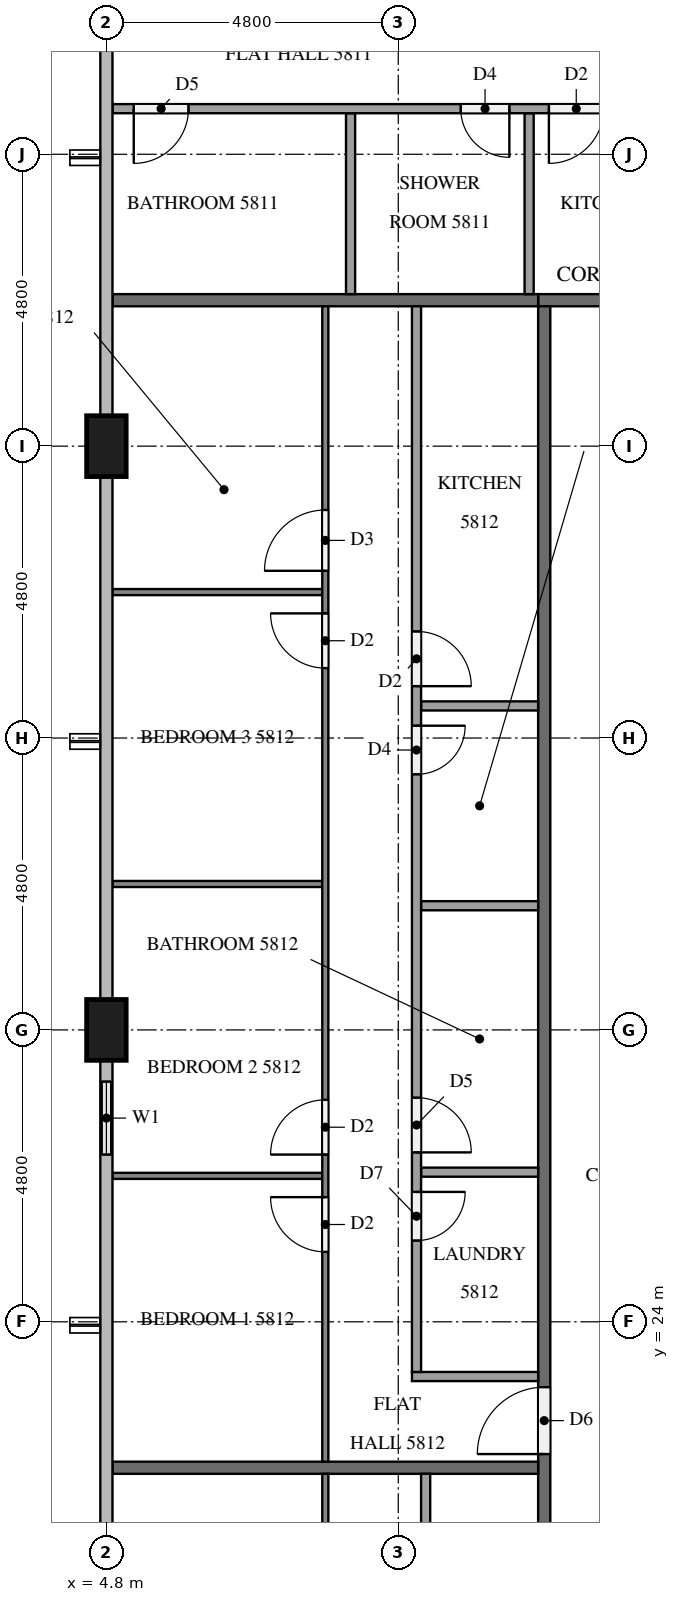
"""IFC4 building model, lengths in metres.
Left out: names, types, materials, properties, quantities, classifications, styles, units other than length and angle.
Written with IfcOpenShell. Run it as: python <this file> out.ifc"""

import sys

from ifc_helpers import new_model, si_unit, direction, frame, frame_2d, origin, origin_2d, place, context, subcontext, project, spatial, rectangle, extrude, element, fill, save


model = new_model("IFC4")
c1 = context("Model", 3, precision=1e-05, world=origin(), true_north=direction((0.0, 1.0)))
c2 = subcontext(c1, "Body", "Model", "MODEL_VIEW")
j1 = project(units=[si_unit("LENGTHUNIT", "METRE"), si_unit("PLANEANGLEUNIT", "RADIAN")], contexts=[c1])
p1 = place(None, origin())
s1 = spatial("IfcSite", under=j1, at=p1, CompositionType="ELEMENT")
p2 = place(p1, origin())
s2 = spatial("IfcBuilding", under=s1, at=p2, CompositionType="ELEMENT")
p3 = place(p2, frame((0.0, 0.0, 222.8)))
s3 = spatial("IfcBuildingStorey", under=s2, at=p3, CompositionType="ELEMENT", Elevation=222.8)
for number, where, z_axis, x_axis in (
    (1, (4.8, 38.4, 0.0), (0.0, 0.0, 1.0), (0.0, 1.0, 0.0)),
    (2, (4.8, 28.8, 0.0), (0.0, 0.0, 1.0), (0.0, 1.0, 0.0)),
):
    element("IfcColumn", number, at=place(p3, frame(where, z_axis=z_axis, x_axis=x_axis)), inside=s3, PredefinedType="COLUMN", context=c2, shape_type="SweptSolid", body=[
        extrude(rectangle(XDim=1.0, YDim=0.65, at=origin_2d()), origin(), (0.0, 0.0, 1.0), 3.2),
    ])
p4 = place(p3, frame((4.8, 28.3, 0.0), z_axis=(0.0, 0.0, 1.0), x_axis=(0.0, -1.0, 0.0)))
e3 = element("IfcWall", 3, at=p4, inside=s3, PredefinedType="SOLIDWALL", context=c2, shape_type="SweptSolid", body=[
    extrude(rectangle(XDim=1.9, YDim=0.15, at=frame_2d((0.95, 0.0))), origin(), (0.0, 0.0, 1.0), 3.2),
])
p5 = place(p4, frame((0.35, 0.0, 0.9)))
e4 = element("IfcOpeningElement", 4, at=p5, cuts=e3, PredefinedType="OPENING", context=c2, shape_type="SweptSolid", body=[
    extrude(rectangle(XDim=1.2, YDim=1.4, at=frame_2d((0.6, 0.7))), frame((0.0, 0.085, 0.0), z_axis=(0.0, -1.0, 0.0), x_axis=(1.0, 0.0, 0.0)), (0.0, 0.0, 1.0), 0.17),
])
p6 = place(p3, frame((11.9, 40.8, 0.0), z_axis=(0.0, 0.0, 1.0), x_axis=(1.0, 0.0, 0.0)))
e5 = element("IfcWall", 5, at=p6, inside=s3, PredefinedType="PARTITIONING", context=c2, shape_type="SweptSolid", body=[
    extrude(rectangle(XDim=38.6, YDim=0.2, at=frame_2d((19.3, 0.0))), origin(), (0.0, 0.0, 1.0), 3.2),
])
p7 = place(p6, frame((33.975, 0.0, 0.0)))
e6 = element("IfcOpeningElement", 6, at=p7, cuts=e5, PredefinedType="OPENING", context=c2, shape_type="SweptSolid", body=[
    extrude(rectangle(XDim=1.0, YDim=2.1, at=frame_2d((0.5, 1.05))), frame((0.0, 0.11, 0.0), z_axis=(0.0, -1.0, 0.0), x_axis=(1.0, 0.0, 0.0)), (0.0, 0.0, 1.0), 0.22),
])
p8 = place(p6, frame((14.725, 0.0, 0.0)))
e7 = element("IfcOpeningElement", 7, at=p8, cuts=e5, PredefinedType="OPENING", context=c2, shape_type="SweptSolid", body=[
    extrude(rectangle(XDim=1.1, YDim=2.1, at=frame_2d((0.55, 1.05))), frame((0.0, 0.11, 0.0), z_axis=(0.0, -1.0, 0.0), x_axis=(1.0, 0.0, 0.0)), (0.0, 0.0, 1.0), 0.22),
])
p9 = place(p6, frame((7.575, 0.0, 0.0)))
e8 = element("IfcOpeningElement", 8, at=p9, cuts=e5, PredefinedType="OPENING", context=c2, shape_type="SweptSolid", body=[
    extrude(rectangle(XDim=1.0, YDim=2.1, at=frame_2d((0.5, 1.05))), frame((0.0, 0.11, 0.0), z_axis=(0.0, -1.0, 0.0), x_axis=(1.0, 0.0, 0.0)), (0.0, 0.0, 1.0), 0.22),
])
p10 = place(p6, frame((6.025, 0.0, 0.0)))
e9 = element("IfcOpeningElement", 9, at=p10, cuts=e5, PredefinedType="OPENING", context=c2, shape_type="SweptSolid", body=[
    extrude(rectangle(XDim=1.0, YDim=2.1, at=frame_2d((0.5, 1.05))), frame((0.0, 0.11, 0.0), z_axis=(0.0, -1.0, 0.0), x_axis=(1.0, 0.0, 0.0)), (0.0, 0.0, 1.0), 0.22),
])
p11 = place(p3, frame((12.0, 12.1, 0.0), z_axis=(0.0, 0.0, 1.0), x_axis=(0.0, 1.0, 0.0)))
e10 = element("IfcWall", 10, at=p11, inside=s3, PredefinedType="PARTITIONING", context=c2, shape_type="SweptSolid", body=[
    extrude(rectangle(XDim=28.6, YDim=0.2, at=frame_2d((14.3, 0.0))), origin(), (0.0, 0.0, 1.0), 3.2),
])
p12 = place(p11, frame((9.725, 0.0, 0.0)))
e11 = element("IfcOpeningElement", 11, at=p12, cuts=e10, PredefinedType="OPENING", context=c2, shape_type="SweptSolid", body=[
    extrude(rectangle(XDim=1.1, YDim=2.1, at=frame_2d((0.55, 1.05))), frame((0.0, 0.11, 0.0), z_axis=(0.0, -1.0, 0.0), x_axis=(1.0, 0.0, 0.0)), (0.0, 0.0, 1.0), 0.22),
])
p13 = place(p11, frame((0.175, 0.0, 0.0)))
e12 = element("IfcOpeningElement", 12, at=p13, cuts=e10, PredefinedType="OPENING", context=c2, shape_type="SweptSolid", body=[
    extrude(rectangle(XDim=1.0, YDim=2.1, at=frame_2d((0.5, 1.05))), frame((0.0, 0.11, 0.0), z_axis=(0.0, -1.0, 0.0), x_axis=(1.0, 0.0, 0.0)), (0.0, 0.0, 1.0), 0.22),
])
for number, where, z_axis, x_axis in (
    (13, (4.9, 40.8, 0.0), (0.0, 0.0, 1.0), (1.0, 0.0, 0.0)),
    (14, (4.9, 21.6, 0.0), (0.0, 0.0, 1.0), (1.0, 0.0, 0.0)),
):
    element("IfcWall", number, at=place(p3, frame(where, z_axis=z_axis, x_axis=x_axis)), inside=s3, PredefinedType="PARTITIONING", context=c2, shape_type="SweptSolid", body=[
        extrude(rectangle(XDim=7.0, YDim=0.2, at=frame_2d((3.5, 0.0))), origin(), (0.0, 0.0, 1.0), 3.2),
    ])
for number, where, z_axis, x_axis in (
    (15, (11.752, 40.9, 0.0), (0.0, 0.0, 1.0), (0.0, 1.0, 0.0)),
    (16, (8.815, 40.9, 0.0), (0.0, 0.0, 1.0), (0.0, 1.0, 0.0)),
):
    element("IfcWall", number, at=place(p3, frame(where, z_axis=z_axis, x_axis=x_axis)), inside=s3, PredefinedType="PARTITIONING", context=c2, shape_type="SweptSolid", body=[
        extrude(rectangle(XDim=2.975, YDim=0.15, at=frame_2d((1.488, 0.0))), origin(), (0.0, 0.0, 1.0), 3.2),
    ])
p14 = place(p3, frame((17.625, 43.95, 0.0), z_axis=(0.0, 0.0, 1.0), x_axis=(-1.0, 0.0, 0.0)))
e17 = element("IfcWall", 17, at=p14, inside=s3, PredefinedType="PARTITIONING", context=c2, shape_type="SweptSolid", body=[
    extrude(rectangle(XDim=12.725, YDim=0.15, at=frame_2d((6.363, 0.0))), origin(), (0.0, 0.0, 1.0), 3.2),
])
p15 = place(p14, frame((4.648, 0.0, 0.0)))
e18 = element("IfcOpeningElement", 18, at=p15, cuts=e17, PredefinedType="OPENING", context=c2, shape_type="SweptSolid", body=[
    extrude(rectangle(XDim=0.9, YDim=2.1, at=frame_2d((0.45, 1.05))), frame((0.0, 0.085, 0.0), z_axis=(0.0, -1.0, 0.0), x_axis=(1.0, 0.0, 0.0)), (0.0, 0.0, 1.0), 0.17),
])
p16 = place(p14, frame((6.198, 0.0, 0.0)))
e19 = element("IfcOpeningElement", 19, at=p16, cuts=e17, PredefinedType="OPENING", context=c2, shape_type="SweptSolid", body=[
    extrude(rectangle(XDim=0.8, YDim=2.1, at=frame_2d((0.4, 1.05))), frame((0.0, 0.085, 0.0), z_axis=(0.0, -1.0, 0.0), x_axis=(1.0, 0.0, 0.0)), (0.0, 0.0, 1.0), 0.17),
])
p17 = place(p14, frame((11.475, 0.0, 0.0)))
e20 = element("IfcOpeningElement", 20, at=p17, cuts=e17, PredefinedType="OPENING", context=c2, shape_type="SweptSolid", body=[
    extrude(rectangle(XDim=0.9, YDim=2.1, at=frame_2d((0.45, 1.05))), frame((0.0, 0.085, 0.0), z_axis=(0.0, -1.0, 0.0), x_axis=(1.0, 0.0, 0.0)), (0.0, 0.0, 1.0), 0.17),
])
for number, where, z_axis, x_axis in (
    (21, (8.35, 26.4, 0.0), (0.0, 0.0, 1.0), (-1.0, 0.0, 0.0)),
    (22, (8.35, 31.2, 0.0), (0.0, 0.0, 1.0), (-1.0, 0.0, 0.0)),
    (23, (8.35, 36.0, 0.0), (0.0, 0.0, 1.0), (-1.0, 0.0, 0.0)),
):
    element("IfcWall", number, at=place(p3, frame(where, z_axis=z_axis, x_axis=x_axis)), inside=s3, PredefinedType="PARTITIONING", context=c2, shape_type="SweptSolid", body=[
        extrude(rectangle(XDim=3.45, YDim=0.1, at=frame_2d((1.725, 0.0))), origin(), (0.0, 0.0, 1.0), 3.2),
    ])
p18 = place(p3, frame((8.4, 21.7, 0.0), z_axis=(0.0, 0.0, 1.0), x_axis=(0.0, 1.0, 0.0)))
e24 = element("IfcWall", 24, at=p18, inside=s3, PredefinedType="PARTITIONING", context=c2, shape_type="SweptSolid", body=[
    extrude(rectangle(XDim=19.0, YDim=0.1, at=frame_2d((9.5, 0.0))), origin(), (0.0, 0.0, 1.0), 3.2),
])
p19 = place(p18, frame((3.45, 0.0, 0.0)))
e25 = element("IfcOpeningElement", 25, at=p19, cuts=e24, PredefinedType="OPENING", context=c2, shape_type="SweptSolid", body=[
    extrude(rectangle(XDim=0.9, YDim=2.1, at=frame_2d((0.45, 1.05))), frame((0.0, 0.06, 0.0), z_axis=(0.0, -1.0, 0.0), x_axis=(1.0, 0.0, 0.0)), (0.0, 0.0, 1.0), 0.12),
])
p20 = place(p18, frame((5.05, 0.0, 0.0)))
e26 = element("IfcOpeningElement", 26, at=p20, cuts=e24, PredefinedType="OPENING", context=c2, shape_type="SweptSolid", body=[
    extrude(rectangle(XDim=0.9, YDim=2.1, at=frame_2d((0.45, 1.05))), frame((0.0, 0.06, 0.0), z_axis=(0.0, -1.0, 0.0), x_axis=(1.0, 0.0, 0.0)), (0.0, 0.0, 1.0), 0.12),
])
p21 = place(p18, frame((13.05, 0.0, 0.0)))
e27 = element("IfcOpeningElement", 27, at=p21, cuts=e24, PredefinedType="OPENING", context=c2, shape_type="SweptSolid", body=[
    extrude(rectangle(XDim=0.9, YDim=2.1, at=frame_2d((0.45, 1.05))), frame((0.0, 0.06, 0.0), z_axis=(0.0, -1.0, 0.0), x_axis=(1.0, 0.0, 0.0)), (0.0, 0.0, 1.0), 0.12),
])
p22 = place(p18, frame((14.65, 0.0, 0.0)))
e28 = element("IfcOpeningElement", 28, at=p22, cuts=e24, PredefinedType="OPENING", context=c2, shape_type="SweptSolid", body=[
    extrude(rectangle(XDim=1.0, YDim=2.1, at=frame_2d((0.5, 1.05))), frame((0.0, 0.06, 0.0), z_axis=(0.0, -1.0, 0.0), x_axis=(1.0, 0.0, 0.0)), (0.0, 0.0, 1.0), 0.12),
])
for number, where, z_axis, x_axis in (
    (29, (11.9, 26.461, 0.0), (0.0, 0.0, 1.0), (-1.0, 0.0, 0.0)),
    (30, (11.9, 30.842, 0.0), (0.0, 0.0, 1.0), (-1.0, 0.0, 0.0)),
    (31, (11.9, 34.128, 0.0), (0.0, 0.0, 1.0), (-1.0, 0.0, 0.0)),
):
    element("IfcWall", number, at=place(p3, frame(where, z_axis=z_axis, x_axis=x_axis)), inside=s3, PredefinedType="PARTITIONING", context=c2, shape_type="SweptSolid", body=[
        extrude(rectangle(XDim=1.925, YDim=0.15, at=frame_2d((0.962, 0.0))), origin(), (0.0, 0.0, 1.0), 3.2),
    ])
p23 = place(p3, frame((11.9, 23.1, 0.0), z_axis=(0.0, 0.0, 1.0), x_axis=(-1.0, 0.0, 0.0)))
e32 = element("IfcWall", 32, at=p23, inside=s3, PredefinedType="PARTITIONING", context=c2, shape_type="SweptSolid", body=[
    extrude(rectangle(XDim=2.075, YDim=0.15, at=frame_2d((1.038, 0.0))), origin(), (0.0, 0.0, 1.0), 3.2),
])
p24 = place(p3, frame((9.9, 40.7, 0.0), z_axis=(0.0, 0.0, 1.0), x_axis=(0.0, -1.0, 0.0)))
e33 = element("IfcWall", 33, at=p24, inside=s3, PredefinedType="PARTITIONING", context=c2, shape_type="SweptSolid", body=[
    extrude(rectangle(XDim=17.525, YDim=0.15, at=frame_2d((8.762, 0.0))), origin(), (0.0, 0.0, 1.0), 3.2),
])
p25 = place(p24, frame((14.564, 0.0, 0.0)))
e34 = element("IfcOpeningElement", 34, at=p25, cuts=e33, PredefinedType="OPENING", context=c2, shape_type="SweptSolid", body=[
    extrude(rectangle(XDim=0.8, YDim=2.1, at=frame_2d((0.4, 1.05))), frame((0.0, 0.085, 0.0), z_axis=(0.0, -1.0, 0.0), x_axis=(1.0, 0.0, 0.0)), (0.0, 0.0, 1.0), 0.17),
])
p26 = place(p24, frame((13.014, 0.0, 0.0)))
e35 = element("IfcOpeningElement", 35, at=p26, cuts=e33, PredefinedType="OPENING", context=c2, shape_type="SweptSolid", body=[
    extrude(rectangle(XDim=0.9, YDim=2.1, at=frame_2d((0.45, 1.05))), frame((0.0, 0.085, 0.0), z_axis=(0.0, -1.0, 0.0), x_axis=(1.0, 0.0, 0.0)), (0.0, 0.0, 1.0), 0.17),
])
p27 = place(p24, frame((6.897, 0.0, 0.0)))
e36 = element("IfcOpeningElement", 36, at=p27, cuts=e33, PredefinedType="OPENING", context=c2, shape_type="SweptSolid", body=[
    extrude(rectangle(XDim=0.8, YDim=2.1, at=frame_2d((0.4, 1.05))), frame((0.0, 0.085, 0.0), z_axis=(0.0, -1.0, 0.0), x_axis=(1.0, 0.0, 0.0)), (0.0, 0.0, 1.0), 0.17),
])
p28 = place(p24, frame((5.347, 0.0, 0.0)))
e37 = element("IfcOpeningElement", 37, at=p28, cuts=e33, PredefinedType="OPENING", context=c2, shape_type="SweptSolid", body=[
    extrude(rectangle(XDim=0.9, YDim=2.1, at=frame_2d((0.45, 1.05))), frame((0.0, 0.085, 0.0), z_axis=(0.0, -1.0, 0.0), x_axis=(1.0, 0.0, 0.0)), (0.0, 0.0, 1.0), 0.17),
])
p29 = place(p3, frame((8.4, 12.1, 0.0), z_axis=(0.0, 0.0, 1.0), x_axis=(0.0, 1.0, 0.0)))
e38 = element("IfcWall", 38, at=p29, inside=s3, PredefinedType="PARTITIONING", context=c2, shape_type="SweptSolid", body=[
    extrude(rectangle(XDim=9.4, YDim=0.1, at=frame_2d((4.7, 0.0))), origin(), (0.0, 0.0, 1.0), 3.2),
])
p30 = place(p29, frame((3.35, 0.0, 0.0)))
e39 = element("IfcOpeningElement", 39, at=p30, cuts=e38, PredefinedType="OPENING", context=c2, shape_type="SweptSolid", body=[
    extrude(rectangle(XDim=1.0, YDim=2.1, at=frame_2d((0.5, 1.05))), frame((0.0, 0.06, 0.0), z_axis=(0.0, -1.0, 0.0), x_axis=(1.0, 0.0, 0.0)), (0.0, 0.0, 1.0), 0.12),
])
p31 = place(p29, frame((5.05, 0.0, 0.0)))
e40 = element("IfcOpeningElement", 40, at=p31, cuts=e38, PredefinedType="OPENING", context=c2, shape_type="SweptSolid", body=[
    extrude(rectangle(XDim=0.9, YDim=2.1, at=frame_2d((0.45, 1.05))), frame((0.0, 0.06, 0.0), z_axis=(0.0, -1.0, 0.0), x_axis=(1.0, 0.0, 0.0)), (0.0, 0.0, 1.0), 0.12),
])
p32 = place(p3, frame((10.05, 21.5, 0.0), z_axis=(0.0, 0.0, 1.0), x_axis=(0.0, -1.0, 0.0)))
e41 = element("IfcWall", 41, at=p32, inside=s3, PredefinedType="PARTITIONING", context=c2, shape_type="SweptSolid", body=[
    extrude(rectangle(XDim=7.925, YDim=0.15, at=frame_2d((3.962, 0.0))), origin(), (0.0, 0.0, 1.0), 3.2),
])
p33 = place(p32, frame((5.08, 0.0, 0.0)))
e42 = element("IfcOpeningElement", 42, at=p33, cuts=e41, PredefinedType="OPENING", context=c2, shape_type="SweptSolid", body=[
    extrude(rectangle(XDim=0.8, YDim=2.1, at=frame_2d((0.4, 1.05))), frame((0.0, 0.085, 0.0), z_axis=(0.0, -1.0, 0.0), x_axis=(1.0, 0.0, 0.0)), (0.0, 0.0, 1.0), 0.17),
])
p34 = place(p32, frame((3.53, 0.0, 0.0)))
e43 = element("IfcOpeningElement", 43, at=p34, cuts=e41, PredefinedType="OPENING", context=c2, shape_type="SweptSolid", body=[
    extrude(rectangle(XDim=0.9, YDim=2.1, at=frame_2d((0.45, 1.05))), frame((0.0, 0.085, 0.0), z_axis=(0.0, -1.0, 0.0), x_axis=(1.0, 0.0, 0.0)), (0.0, 0.0, 1.0), 0.17),
])
p35 = place(p5, origin())
e44 = element("IfcWindow", 44, at=p35, inside=s3, PartitioningType="SINGLE_PANEL", PredefinedType="WINDOW", context=c2, shape_type="SweptSolid", body=[
    extrude(rectangle(XDim=1.2, YDim=1.4, at=frame_2d((0.6, 0.7))), frame((0.0, 0.03, 0.0), z_axis=(0.0, -1.0, 0.0), x_axis=(1.0, 0.0, 0.0)), (0.0, 0.0, 1.0), 0.06),
])
fill(e4, e44)
p36 = place(p12, origin())
e45 = element("IfcDoor", 45, at=p36, inside=s3, OperationType="SINGLE_SWING_LEFT", PredefinedType="DOOR", context=c2, shape_type="SweptSolid", body=[
    extrude(rectangle(XDim=1.1, YDim=2.1, at=frame_2d((0.55, 1.05))), frame((0.0, 0.025, 0.0), z_axis=(0.0, -1.0, 0.0), x_axis=(1.0, 0.0, 0.0)), (0.0, 0.0, 1.0), 0.05),
])
fill(e11, e45)
p37 = place(p15, origin())
e46 = element("IfcDoor", 46, at=p37, inside=s3, OperationType="SINGLE_SWING_RIGHT", PredefinedType="DOOR", context=c2, shape_type="SweptSolid", body=[
    extrude(rectangle(XDim=0.9, YDim=2.1, at=frame_2d((0.45, 1.05))), frame((0.0, 0.025, 0.0), z_axis=(0.0, -1.0, 0.0), x_axis=(1.0, 0.0, 0.0)), (0.0, 0.0, 1.0), 0.05),
])
fill(e18, e46)
p38 = place(p16, origin())
e47 = element("IfcDoor", 47, at=p38, inside=s3, OperationType="SINGLE_SWING_LEFT", PredefinedType="DOOR", context=c2, shape_type="SweptSolid", body=[
    extrude(rectangle(XDim=0.8, YDim=2.1, at=frame_2d((0.4, 1.05))), frame((0.0, 0.025, 0.0), z_axis=(0.0, -1.0, 0.0), x_axis=(1.0, 0.0, 0.0)), (0.0, 0.0, 1.0), 0.05),
])
fill(e19, e47)
p39 = place(p17, origin())
e48 = element("IfcDoor", 48, at=p39, inside=s3, OperationType="SINGLE_SWING_RIGHT", PredefinedType="DOOR", context=c2, shape_type="SweptSolid", body=[
    extrude(rectangle(XDim=0.9, YDim=2.1, at=frame_2d((0.45, 1.05))), frame((0.0, 0.025, 0.0), z_axis=(0.0, -1.0, 0.0), x_axis=(1.0, 0.0, 0.0)), (0.0, 0.0, 1.0), 0.05),
])
fill(e20, e48)
p40 = place(p19, origin())
e49 = element("IfcDoor", 49, at=p40, inside=s3, OperationType="SINGLE_SWING_RIGHT", PredefinedType="DOOR", context=c2, shape_type="SweptSolid", body=[
    extrude(rectangle(XDim=0.9, YDim=2.1, at=frame_2d((0.45, 1.05))), frame((0.0, 0.025, 0.0), z_axis=(0.0, -1.0, 0.0), x_axis=(1.0, 0.0, 0.0)), (0.0, 0.0, 1.0), 0.05),
])
fill(e25, e49)
p41 = place(p20, origin())
e50 = element("IfcDoor", 50, at=p41, inside=s3, OperationType="SINGLE_SWING_LEFT", PredefinedType="DOOR", context=c2, shape_type="SweptSolid", body=[
    extrude(rectangle(XDim=0.9, YDim=2.1, at=frame_2d((0.45, 1.05))), frame((0.0, 0.025, 0.0), z_axis=(0.0, -1.0, 0.0), x_axis=(1.0, 0.0, 0.0)), (0.0, 0.0, 1.0), 0.05),
])
fill(e26, e50)
p42 = place(p21, origin())
e51 = element("IfcDoor", 51, at=p42, inside=s3, OperationType="SINGLE_SWING_RIGHT", PredefinedType="DOOR", context=c2, shape_type="SweptSolid", body=[
    extrude(rectangle(XDim=0.9, YDim=2.1, at=frame_2d((0.45, 1.05))), frame((0.0, 0.025, 0.0), z_axis=(0.0, -1.0, 0.0), x_axis=(1.0, 0.0, 0.0)), (0.0, 0.0, 1.0), 0.05),
])
fill(e27, e51)
p43 = place(p22, origin())
e52 = element("IfcDoor", 52, at=p43, inside=s3, OperationType="SINGLE_SWING_LEFT", PredefinedType="DOOR", context=c2, shape_type="SweptSolid", body=[
    extrude(rectangle(XDim=1.0, YDim=2.1, at=frame_2d((0.5, 1.05))), frame((0.0, 0.025, 0.0), z_axis=(0.0, -1.0, 0.0), x_axis=(1.0, 0.0, 0.0)), (0.0, 0.0, 1.0), 0.05),
])
fill(e28, e52)
p44 = place(p25, origin())
e53 = element("IfcDoor", 53, at=p44, inside=s3, OperationType="SINGLE_SWING_LEFT", PredefinedType="DOOR", context=c2, shape_type="SweptSolid", body=[
    extrude(rectangle(XDim=0.8, YDim=2.1, at=frame_2d((0.4, 1.05))), frame((0.0, 0.025, 0.0), z_axis=(0.0, -1.0, 0.0), x_axis=(1.0, 0.0, 0.0)), (0.0, 0.0, 1.0), 0.05),
])
fill(e34, e53)
p45 = place(p26, origin())
e54 = element("IfcDoor", 54, at=p45, inside=s3, OperationType="SINGLE_SWING_RIGHT", PredefinedType="DOOR", context=c2, shape_type="SweptSolid", body=[
    extrude(rectangle(XDim=0.9, YDim=2.1, at=frame_2d((0.45, 1.05))), frame((0.0, 0.025, 0.0), z_axis=(0.0, -1.0, 0.0), x_axis=(1.0, 0.0, 0.0)), (0.0, 0.0, 1.0), 0.05),
])
fill(e35, e54)
p46 = place(p27, origin())
e55 = element("IfcDoor", 55, at=p46, inside=s3, OperationType="SINGLE_SWING_LEFT", PredefinedType="DOOR", context=c2, shape_type="SweptSolid", body=[
    extrude(rectangle(XDim=0.8, YDim=2.1, at=frame_2d((0.4, 1.05))), frame((0.0, 0.025, 0.0), z_axis=(0.0, -1.0, 0.0), x_axis=(1.0, 0.0, 0.0)), (0.0, 0.0, 1.0), 0.05),
])
fill(e36, e55)
p47 = place(p28, origin())
e56 = element("IfcDoor", 56, at=p47, inside=s3, OperationType="SINGLE_SWING_RIGHT", PredefinedType="DOOR", context=c2, shape_type="SweptSolid", body=[
    extrude(rectangle(XDim=0.9, YDim=2.1, at=frame_2d((0.45, 1.05))), frame((0.0, 0.025, 0.0), z_axis=(0.0, -1.0, 0.0), x_axis=(1.0, 0.0, 0.0)), (0.0, 0.0, 1.0), 0.05),
])
fill(e37, e56)
save(model, sys.argv[1])
